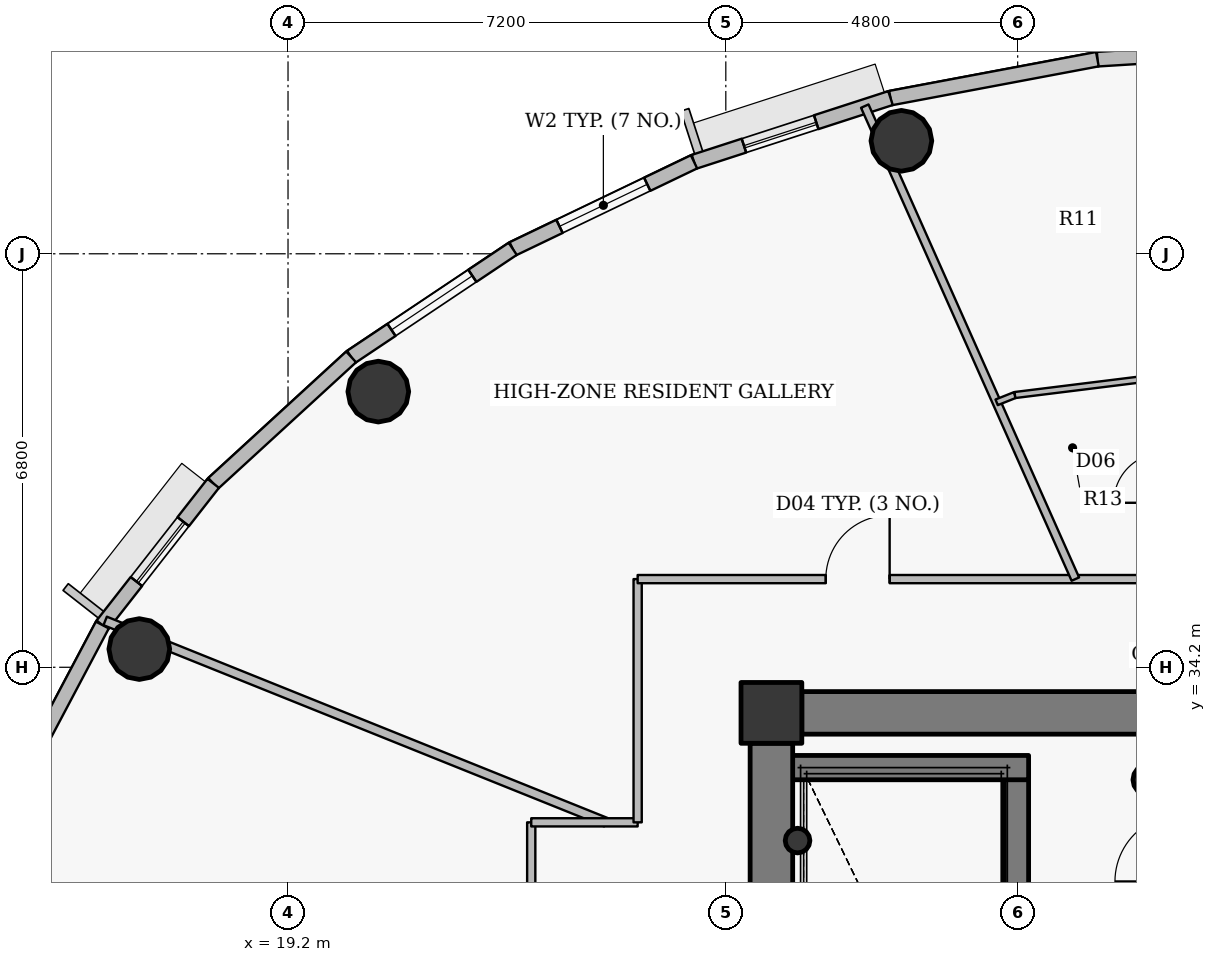
"""IFC4 building model, lengths in metres.
Left out: names, types, materials, properties, quantities, classifications, styles, units other than length and angle.
Written with IfcOpenShell. Run it as: python <this file> out.ifc"""

import sys

from ifc_helpers import new_model, si_unit, direction, frame, frame_2d, origin, origin_2d, place, context, subcontext, project, spatial, rectangle, hollow_circle, extrude, source, transform, mapped, element, fill, save


model = new_model("IFC4")
c1 = context("Model", 3, precision=1e-05, world=origin(), true_north=direction((0.0, 1.0)))
c2 = subcontext(c1, "Body", "Model", "MODEL_VIEW")
j1 = project(units=[si_unit("LENGTHUNIT", "METRE"), si_unit("PLANEANGLEUNIT", "RADIAN")], contexts=[c1])
p1 = place(None, origin())
s1 = spatial("IfcSite", under=j1, at=p1, CompositionType="ELEMENT")
p2 = place(p1, origin())
s2 = spatial("IfcBuilding", under=s1, at=p2, CompositionType="ELEMENT")
p3 = place(p2, frame((0.0, 0.0, 314.25)))
s3 = spatial("IfcBuildingStorey", under=s2, at=p3, CompositionType="ELEMENT", Elevation=314.25)
p4 = place(p3, frame((27.15, 33.45, 0.0), z_axis=(0.0, 0.0, 1.0), x_axis=(1.0, 0.0, 0.0)))
e1 = element("IfcColumn", 1, at=p4, inside=s3, PredefinedType="COLUMN", context=c2, shape_type="SweptSolid", body=[
    extrude(rectangle(XDim=1.0, YDim=1.0, at=origin_2d()), origin(), (0.0, 0.0, 1.0), 3.75),
])
p5 = place(p3, frame((33.35, 32.35, 0.0), z_axis=(0.0, 0.0, 1.0), x_axis=(1.0, 0.0, 0.0)))
e2 = element("IfcColumn", 2, at=p5, inside=s3, PredefinedType="COLUMN", context=c2, shape_type="SweptSolid", body=[
    extrude(hollow_circle(Radius=0.254, WallThickness=0.02, at=origin_2d()), origin(), (0.0, 0.0, 1.0), 3.75),
])
p6 = place(p3, frame((31.18, 27.8, 0.0), z_axis=(0.0, 0.0, 1.0), x_axis=(0.0, 1.0, 0.0)))
e3 = element("IfcWall", 3, at=p6, inside=s3, PredefinedType="SHEAR", context=c2, shape_type="SweptSolid", body=[
    extrude(rectangle(XDim=4.75, YDim=0.4, at=frame_2d((2.375, 0.0))), origin(), (0.0, 0.0, 1.0), 3.75),
])
p7 = place(p3, frame((27.25, 32.55, 0.0), z_axis=(0.0, 0.0, 1.0), x_axis=(1.0, 0.0, 0.0)))
e4 = element("IfcWall", 4, at=p7, inside=s3, PredefinedType="SHEAR", context=c2, shape_type="SweptSolid", body=[
    extrude(rectangle(XDim=4.13, YDim=0.4, at=frame_2d((2.065, 0.0))), origin(), (0.0, 0.0, 1.0), 3.75),
])
p8 = place(p3, frame((27.58, 31.35, 0.0), z_axis=(0.0, 0.0, 1.0), x_axis=(1.0, 0.0, 0.0)))
e5 = element("IfcColumn", 5, at=p8, inside=s3, PredefinedType="COLUMN", context=c2, shape_type="SweptSolid", body=[
    extrude(hollow_circle(Radius=0.203, WallThickness=0.016, at=origin_2d()), origin(), (0.0, 0.0, 1.0), 3.75),
])
p9 = place(p3, frame((27.65, 33.45, 0.0), z_axis=(0.0, 0.0, 1.0), x_axis=(1.0, 0.0, 0.0)))
e6 = element("IfcWall", 6, at=p9, inside=s3, PredefinedType="SHEAR", context=c2, shape_type="SweptSolid", body=[
    extrude(rectangle(XDim=16.7, YDim=0.7, at=frame_2d((8.35, 0.0))), origin(), (0.0, 0.0, 1.0), 3.0),
])
p10 = place(p9, frame((12.775, 0.0, 0.0)))
e7 = element("IfcOpeningElement", 7, at=p10, cuts=e6, PredefinedType="OPENING", context=c2, shape_type="SweptSolid", body=[
    extrude(rectangle(XDim=1.15, YDim=2.15, at=origin_2d()), frame((0.575, 0.36, 1.075), z_axis=(0.0, -1.0, 0.0), x_axis=(1.0, 0.0, 0.0)), (0.0, 0.0, 1.0), 0.72),
])
p11 = place(p3, frame((27.15, 21.05, 0.0), z_axis=(0.0, 0.0, 1.0), x_axis=(0.0, 1.0, 0.0)))
e8 = element("IfcWall", 8, at=p11, inside=s3, PredefinedType="SHEAR", context=c2, shape_type="SweptSolid", body=[
    extrude(rectangle(XDim=11.9, YDim=0.7, at=frame_2d((5.95, 0.0))), origin(), (0.0, 0.0, 1.0), 3.0),
])
for number, where, z_axis, x_axis in (
    (9, (29.288, 42.858, 0.0), (0.0, 0.0, 1.0), (1.0, 0.0, 0.0)),
    (10, (20.685, 38.733, 0.0), (0.0, 0.0, 1.0), (1.0, 0.0, 0.0)),
    (11, (16.754, 34.5, 0.0), (0.0, 0.0, 1.0), (1.0, 0.0, 0.0)),
):
    element("IfcColumn", number, at=place(p3, frame(where, z_axis=z_axis, x_axis=x_axis)), inside=s3, PredefinedType="COLUMN", context=c2, shape_type="SweptSolid", body=[
        extrude(hollow_circle(Radius=0.5, WallThickness=0.032, at=origin_2d()), origin(), (0.0, 0.0, 1.0), 3.75),
    ])
p12 = place(p3, frame((32.511, 44.2, 0.0), z_axis=(0.0, 0.0, 1.0), x_axis=(0.998104946479, 0.061534671648, 0.0)))
e12 = element("IfcWall", 12, at=p12, inside=s3, PredefinedType="SOLIDWALL", context=c2, shape_type="SweptSolid", body=[
    extrude(rectangle(XDim=3.495, YDim=0.24, at=frame_2d((1.748, 0.0))), origin(), (0.0, 0.0, 1.0), 3.45),
])
p13 = place(p12, frame((1.123, 0.0, 0.9)))
e13 = element("IfcOpeningElement", 13, at=p13, cuts=e12, PredefinedType="OPENING", context=c2, shape_type="SweptSolid", body=[
    extrude(rectangle(XDim=1.25, YDim=1.65, at=origin_2d()), frame((0.625, 0.13, 0.825), z_axis=(0.0, -1.0, 0.0), x_axis=(1.0, 0.0, 0.0)), (0.0, 0.0, 1.0), 0.26),
])
p14 = place(p3, frame((29.109, 43.56, 0.0), z_axis=(0.0, 0.0, 1.0), x_axis=(0.982782655757, 0.184765395959, 0.0)))
e14 = element("IfcWall", 14, at=p14, inside=s3, PredefinedType="SOLIDWALL", context=c2, shape_type="SweptSolid", body=[
    extrude(rectangle(XDim=3.462, YDim=0.24, at=frame_2d((1.731, 0.0))), origin(), (0.0, 0.0, 1.0), 3.45),
])
p15 = place(p3, frame((25.877, 42.512, 0.0), z_axis=(0.0, 0.0, 1.0), x_axis=(0.95123136723, 0.308478339592, 0.0)))
e15 = element("IfcWall", 15, at=p15, inside=s3, PredefinedType="SOLIDWALL", context=c2, shape_type="SweptSolid", body=[
    extrude(rectangle(XDim=3.398, YDim=0.24, at=frame_2d((1.699, 0.0))), origin(), (0.0, 0.0, 1.0), 3.45),
])
p16 = place(p15, frame((0.863, 0.0, 0.9)))
e16 = element("IfcOpeningElement", 16, at=p16, cuts=e15, PredefinedType="OPENING", context=c2, shape_type="SweptSolid", body=[
    extrude(rectangle(XDim=1.25, YDim=1.65, at=origin_2d()), frame((0.625, 0.13, 0.825), z_axis=(0.0, -1.0, 0.0), x_axis=(1.0, 0.0, 0.0)), (0.0, 0.0, 1.0), 0.26),
])
p17 = place(p3, frame((22.896, 41.082, 0.0), z_axis=(0.0, 0.0, 1.0), x_axis=(0.901573741254, 0.43262546051, 0.0)))
e17 = element("IfcWall", 17, at=p17, inside=s3, PredefinedType="SOLIDWALL", context=c2, shape_type="SweptSolid", body=[
    extrude(rectangle(XDim=3.307, YDim=0.24, at=frame_2d((1.653, 0.0))), origin(), (0.0, 0.0, 1.0), 3.45),
])
p18 = place(p17, frame((0.854, 0.0, 0.9)))
e18 = element("IfcOpeningElement", 18, at=p18, cuts=e17, PredefinedType="OPENING", context=c2, shape_type="SweptSolid", body=[
    extrude(rectangle(XDim=1.6, YDim=1.75, at=origin_2d()), frame((0.8, 0.13, 0.875), z_axis=(0.0, -1.0, 0.0), x_axis=(1.0, 0.0, 0.0)), (0.0, 0.0, 1.0), 0.26),
])
p19 = place(p3, frame((20.238, 39.304, 0.0), z_axis=(0.0, 0.0, 1.0), x_axis=(0.831250592635, 0.55589787933, 0.0)))
e19 = element("IfcWall", 19, at=p19, inside=s3, PredefinedType="SOLIDWALL", context=c2, shape_type="SweptSolid", body=[
    extrude(rectangle(XDim=3.197, YDim=0.24, at=frame_2d((1.599, 0.0))), origin(), (0.0, 0.0, 1.0), 3.45),
])
p20 = place(p19, frame((0.799, 0.0, 0.9)))
e20 = element("IfcOpeningElement", 20, at=p20, cuts=e19, PredefinedType="OPENING", context=c2, shape_type="SweptSolid", body=[
    extrude(rectangle(XDim=1.6, YDim=1.75, at=origin_2d()), frame((0.8, 0.13, 0.875), z_axis=(0.0, -1.0, 0.0), x_axis=(1.0, 0.0, 0.0)), (0.0, 0.0, 1.0), 0.26),
])
p21 = place(p3, frame((17.97, 37.225, 0.0), z_axis=(0.0, 0.0, 1.0), x_axis=(0.737068506972, 0.675818034703, 0.0)))
e21 = element("IfcWall", 21, at=p21, inside=s3, PredefinedType="SOLIDWALL", context=c2, shape_type="SweptSolid", body=[
    extrude(rectangle(XDim=3.077, YDim=0.24, at=frame_2d((1.539, 0.0))), origin(), (0.0, 0.0, 1.0), 3.45),
])
p22 = place(p3, frame((16.146, 34.895, 0.0), z_axis=(0.0, 0.0, 1.0), x_axis=(0.616337186556, 0.787482363275, 0.0)))
e22 = element("IfcWall", 22, at=p22, inside=s3, PredefinedType="SOLIDWALL", context=c2, shape_type="SweptSolid", body=[
    extrude(rectangle(XDim=2.958, YDim=0.24, at=frame_2d((1.479, 0.0))), origin(), (0.0, 0.0, 1.0), 3.45),
])
p23 = place(p22, frame((0.909, 0.0, 0.9)))
e23 = element("IfcOpeningElement", 23, at=p23, cuts=e22, PredefinedType="OPENING", context=c2, shape_type="SweptSolid", body=[
    extrude(rectangle(XDim=1.25, YDim=1.65, at=origin_2d()), frame((0.625, 0.13, 0.825), z_axis=(0.0, -1.0, 0.0), x_axis=(1.0, 0.0, 0.0)), (0.0, 0.0, 1.0), 0.26),
])
p24 = place(p3, frame((14.812, 32.372, 0.0), z_axis=(0.0, 0.0, 1.0), x_axis=(0.467628269026, 0.883925224218, 0.0)))
e24 = element("IfcWall", 24, at=p24, inside=s3, PredefinedType="SOLIDWALL", context=c2, shape_type="SweptSolid", body=[
    extrude(rectangle(XDim=2.854, YDim=0.24, at=frame_2d((1.427, 0.0))), origin(), (0.0, 0.0, 1.0), 3.45),
])
p25 = place(p3, frame((16.193, 34.962, 0.0), z_axis=(0.0, 0.0, 1.0), x_axis=(0.927839710722, -0.372979183343, 0.0)))
e25 = element("IfcWall", 25, at=p25, inside=s3, PredefinedType="PARTITIONING", context=c2, shape_type="SweptSolid", body=[
    extrude(rectangle(XDim=8.874, YDim=0.15, at=frame_2d((4.437, 0.0))), origin(), (0.0, 0.0, 1.0), 2.985),
])
p26 = place(p3, frame((23.2, 29.8, 0.0), z_axis=(0.0, 0.0, 1.0), x_axis=(0.0, 1.0, 0.0)))
e26 = element("IfcWall", 26, at=p26, inside=s3, PredefinedType="PARTITIONING", context=c2, shape_type="SweptSolid", body=[
    extrude(rectangle(XDim=1.85, YDim=0.135, at=frame_2d((0.925, 0.0))), origin(), (0.0, 0.0, 1.0), 3.45),
])
p27 = place(p3, frame((23.2, 31.65, 0.0), z_axis=(0.0, 0.0, 1.0), x_axis=(1.0, 0.0, 0.0)))
e27 = element("IfcWall", 27, at=p27, inside=s3, PredefinedType="PARTITIONING", context=c2, shape_type="SweptSolid", body=[
    extrude(rectangle(XDim=1.75, YDim=0.135, at=frame_2d((0.875, 0.0))), origin(), (0.0, 0.0, 1.0), 2.985),
])
p28 = place(p3, frame((24.95, 31.65, 0.0), z_axis=(0.0, 0.0, 1.0), x_axis=(0.0, 1.0, 0.0)))
e28 = element("IfcWall", 28, at=p28, inside=s3, PredefinedType="PARTITIONING", context=c2, shape_type="SweptSolid", body=[
    extrude(rectangle(XDim=4.0, YDim=0.135, at=frame_2d((2.0, 0.0))), origin(), (0.0, 0.0, 1.0), 2.985),
])
p29 = place(p3, frame((24.95, 35.65, 0.0), z_axis=(0.0, 0.0, 1.0), x_axis=(1.0, 0.0, 0.0)))
e29 = element("IfcWall", 29, at=p29, inside=s3, PredefinedType="PARTITIONING", context=c2, shape_type="SweptSolid", body=[
    extrude(rectangle(XDim=10.1, YDim=0.135, at=frame_2d((5.05, 0.0))), origin(), (0.0, 0.0, 1.0), 2.985),
])
p30 = place(p29, frame((3.094, 0.0, 0.0)))
e30 = element("IfcOpeningElement", 30, at=p30, cuts=e29, PredefinedType="OPENING", context=c2, shape_type="SweptSolid", body=[
    extrude(rectangle(XDim=1.05, YDim=2.15, at=origin_2d()), frame((0.525, 0.078, 1.075), z_axis=(0.0, -1.0, 0.0), x_axis=(1.0, 0.0, 0.0)), (0.0, 0.0, 1.0), 0.155),
])
p31 = place(p3, frame((28.686, 43.428, 0.0), z_axis=(0.0, 0.0, 1.0), x_axis=(0.406736980157, -0.913545307564, 0.0)))
e31 = element("IfcWall", 31, at=p31, inside=s3, PredefinedType="PARTITIONING", context=c2, shape_type="SweptSolid", body=[
    extrude(rectangle(XDim=8.514, YDim=0.135, at=frame_2d((4.257, 0.0))), origin(), (0.0, 0.0, 1.0), 2.985),
])
p32 = place(p3, frame((30.854, 38.557, 0.0), z_axis=(0.0, 0.0, 1.0), x_axis=(0.928996661722, 0.370088101011, 0.0)))
e32 = element("IfcWall", 32, at=p32, inside=s3, PredefinedType="PARTITIONING", context=c2, shape_type="SweptSolid", body=[
    extrude(rectangle(XDim=0.323, YDim=0.1, at=frame_2d((0.162, 0.0))), origin(), (0.0, 0.0, 1.0), 2.985),
])
p33 = place(p3, frame((31.155, 38.677, 0.0), z_axis=(0.0, 0.0, 1.0), x_axis=(0.99239360053, 0.123105408601, 0.0)))
e33 = element("IfcWall", 33, at=p33, inside=s3, PredefinedType="PARTITIONING", context=c2, shape_type="SweptSolid", body=[
    extrude(rectangle(XDim=4.883, YDim=0.1, at=frame_2d((2.441, 0.0))), origin(), (0.0, 0.0, 1.0), 2.985),
])
p34 = place(p33, frame((3.203, 0.0, 0.0)))
e34 = element("IfcOpeningElement", 34, at=p34, cuts=e33, PredefinedType="OPENING", context=c2, shape_type="SweptSolid", body=[
    extrude(rectangle(XDim=0.9, YDim=2.1, at=origin_2d()), frame((0.45, 0.06, 1.05), z_axis=(0.0, -1.0, 0.0), x_axis=(1.0, 0.0, 0.0)), (0.0, 0.0, 1.0), 0.12),
])
p35 = place(p3, frame((27.64, 33.8, 0.0), z_axis=(0.0, 0.0, 1.0), x_axis=(-1.0, 0.0, 0.0)))
e35 = element("IfcWall", 35, at=p35, inside=s3, PredefinedType="PARTITIONING", context=c2, shape_type="SweptSolid", body=[
    extrude(rectangle(XDim=0.84, YDim=0.135, at=frame_2d((0.42, 0.0))), origin(), (0.0, 0.0, 1.0), 2.985),
])
p36 = place(p3, frame((26.8, 33.492, 0.0), z_axis=(0.0, 0.0, 1.0), x_axis=(0.0, -1.0, 0.0)))
e36 = element("IfcWall", 36, at=p36, inside=s3, PredefinedType="PARTITIONING", context=c2, shape_type="SweptSolid", body=[
    extrude(rectangle(XDim=0.532, YDim=0.135, at=frame_2d((0.266, 0.0))), origin(), (0.0, 0.0, 1.0), 3.45),
])
m1 = source(origin(), c2, "Body", "SweptSolid", [
    extrude(rectangle(XDim=1.25, YDim=1.65, at=origin_2d()), frame((0.625, 0.03, 0.825), z_axis=(0.0, -1.0, 0.0), x_axis=(1.0, 0.0, 0.0)), (0.0, 0.0, 1.0), 0.06),
])
p37 = place(p16, origin())
e37 = element("IfcWindow", 37, at=p37, inside=s3, PartitioningType="SINGLE_PANEL", PredefinedType="WINDOW", context=c2, shape_type="MappedRepresentation", body=[
    mapped(m1, transform((0.0, 0.0, 0.0), x_axis=(1.0, 0.0, 0.0), y_axis=(0.0, 1.0, 0.0), z_axis=(0.0, 0.0, 1.0), scale=1.0)),
])
fill(e16, e37)
m2 = source(origin(), c2, "Body", "SweptSolid", [
    extrude(rectangle(XDim=1.6, YDim=1.75, at=origin_2d()), frame((0.8, 0.03, 0.875), z_axis=(0.0, -1.0, 0.0), x_axis=(1.0, 0.0, 0.0)), (0.0, 0.0, 1.0), 0.06),
])
p38 = place(p18, origin())
e38 = element("IfcWindow", 38, at=p38, inside=s3, PartitioningType="DOUBLE_PANEL_VERTICAL", PredefinedType="WINDOW", context=c2, shape_type="MappedRepresentation", body=[
    mapped(m2, transform((0.0, 0.0, 0.0), x_axis=(1.0, 0.0, 0.0), y_axis=(0.0, 1.0, 0.0), z_axis=(0.0, 0.0, 1.0), scale=1.0)),
])
fill(e18, e38)
p39 = place(p20, origin())
e39 = element("IfcWindow", 39, at=p39, inside=s3, PartitioningType="DOUBLE_PANEL_VERTICAL", PredefinedType="WINDOW", context=c2, shape_type="MappedRepresentation", body=[
    mapped(m2, transform((0.0, 0.0, 0.0), x_axis=(1.0, 0.0, 0.0), y_axis=(0.0, 1.0, 0.0), z_axis=(0.0, 0.0, 1.0), scale=1.0)),
])
fill(e20, e39)
p40 = place(p23, origin())
e40 = element("IfcWindow", 40, at=p40, inside=s3, PartitioningType="SINGLE_PANEL", PredefinedType="WINDOW", context=c2, shape_type="MappedRepresentation", body=[
    mapped(m1, transform((0.0, 0.0, 0.0), x_axis=(1.0, 0.0, 0.0), y_axis=(0.0, 1.0, 0.0), z_axis=(0.0, 0.0, 1.0), scale=1.0)),
])
fill(e23, e40)
m3 = source(origin(), c2, "Body", "SweptSolid", [
    extrude(rectangle(XDim=1.05, YDim=2.15, at=origin_2d()), frame((0.525, 0.025, 1.075), z_axis=(0.0, -1.0, 0.0), x_axis=(1.0, 0.0, 0.0)), (0.0, 0.0, 1.0), 0.05),
])
p41 = place(p30, origin())
e41 = element("IfcDoor", 41, at=p41, inside=s3, OperationType="SINGLE_SWING_RIGHT", PredefinedType="DOOR", context=c2, shape_type="MappedRepresentation", body=[
    mapped(m3, transform((0.0, 0.0, 0.0), x_axis=(1.0, 0.0, 0.0), y_axis=(0.0, 1.0, 0.0), z_axis=(0.0, 0.0, 1.0), scale=1.0)),
])
fill(e30, e41)
save(model, sys.argv[1])
